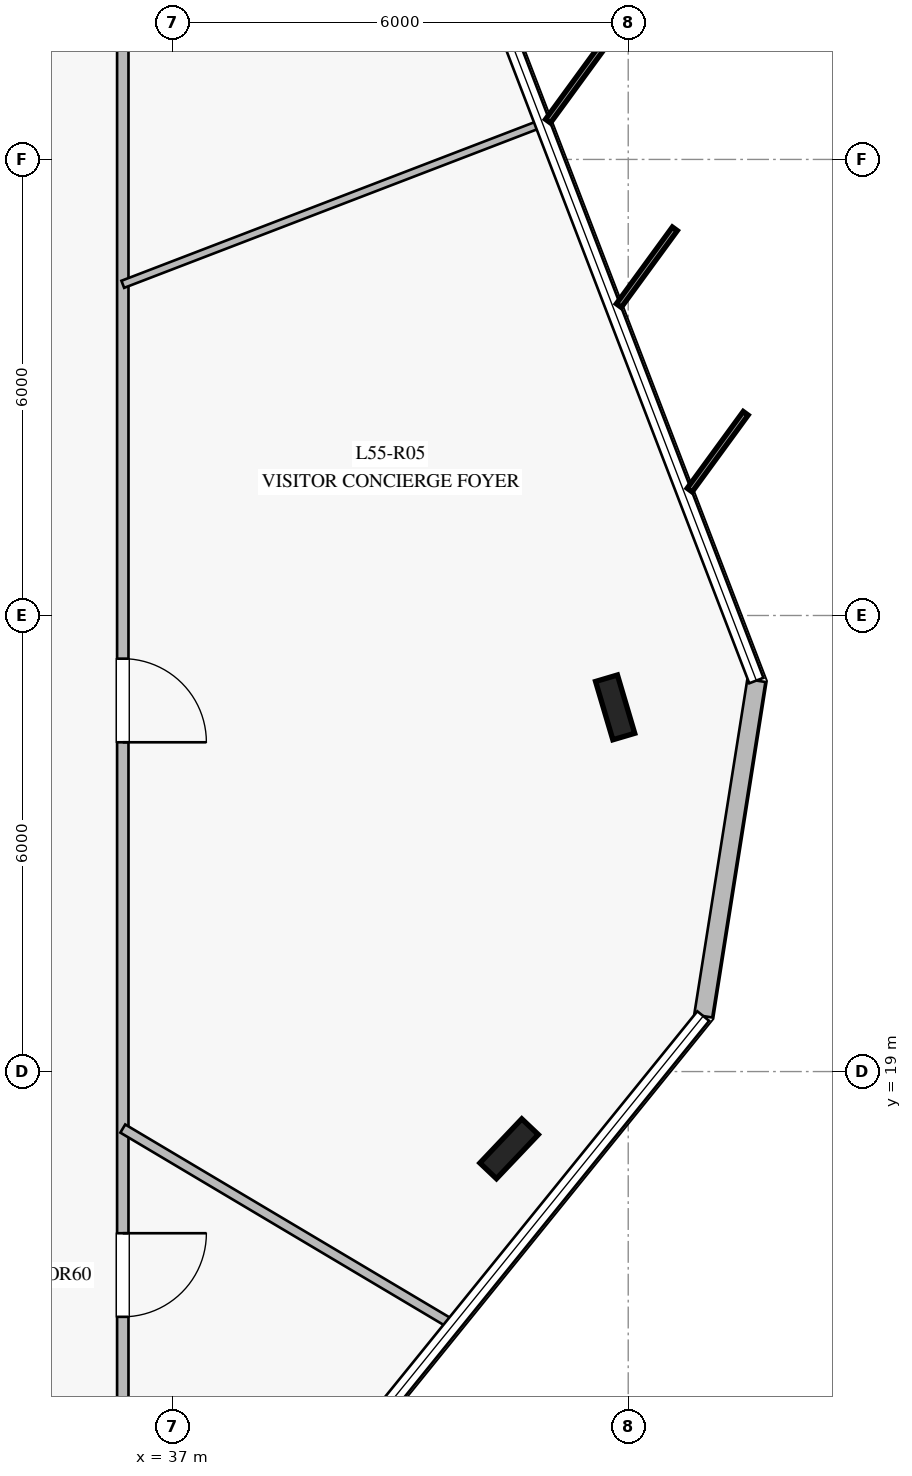
"""IFC4 building model, lengths in metres.
Left out: names, types, materials, properties, quantities, classifications, styles, units other than length and angle.
Written with IfcOpenShell. Run it as: python <this file> out.ifc"""

import sys

from ifc_helpers import new_model, si_unit, direction, frame, frame_2d, origin, origin_2d, place, context, subcontext, project, spatial, rectangle, i_section, extrude, element, fill, save


model = new_model("IFC4")
c1 = context("Model", 3, precision=1e-05, world=origin(), true_north=direction((0.0, 1.0)))
c2 = subcontext(c1, "Body", "Model", "MODEL_VIEW")
j1 = project(units=[si_unit("LENGTHUNIT", "METRE"), si_unit("PLANEANGLEUNIT", "RADIAN")], contexts=[c1])
p1 = place(None, origin())
s1 = spatial("IfcSite", under=j1, at=p1, CompositionType="ELEMENT")
p2 = place(p1, origin())
s2 = spatial("IfcBuilding", under=s1, at=p2, CompositionType="ELEMENT")
p3 = place(p2, frame((0.0, 0.0, 228.8)))
s3 = spatial("IfcBuildingStorey", under=s2, at=p3, CompositionType="ELEMENT", Elevation=228.8)
for number, where, z_axis, x_axis in (
    (1, (41.433, 17.984, 0.0), (0.0, 0.0, 1.0), (0.688, 0.725, 0.0)),
    (2, (42.828, 23.791, 0.0), (0.0, 0.0, 1.0), (-0.284, 0.959, 0.0)),
):
    element("IfcColumn", number, at=place(p3, frame(where, z_axis=z_axis, x_axis=x_axis)), inside=s3, PredefinedType="COLUMN", context=c2, shape_type="SweptSolid", body=[
        extrude(i_section(OverallWidth=0.3, OverallDepth=0.8, WebThickness=0.018, FlangeThickness=0.033, at=origin_2d()), origin(), (0.0, 0.0, 1.0), 4.0),
    ])
p4 = place(p3, frame((43.987, 19.73, 0.0), z_axis=(0.0, 0.0, 1.0), x_axis=(0.156402986275, 0.987693325828, 0.0)))
e3 = element("IfcWall", 3, at=p4, inside=s3, PredefinedType="STANDARD", context=c2, shape_type="SweptSolid", body=[
    extrude(rectangle(XDim=4.469, YDim=0.24, at=frame_2d((2.234, 0.0))), origin(), (0.0, 0.0, 1.0), 3.78),
])
p5 = place(p3, frame((36.35, 35.75, 0.0), z_axis=(0.0, 0.0, 1.0), x_axis=(0.0, -1.0, 0.0)))
e4 = element("IfcWall", 4, at=p5, inside=s3, PredefinedType="PARTITIONING", context=c2, shape_type="SweptSolid", body=[
    extrude(rectangle(XDim=21.5, YDim=0.15, at=frame_2d((10.75, 0.0))), origin(), (0.0, 0.0, 1.0), 3.28),
])
p6 = place(p5, frame((18.877, 0.0, 0.0)))
e5 = element("IfcOpeningElement", 5, at=p6, cuts=e4, PredefinedType="OPENING", context=c2, shape_type="SweptSolid", body=[
    extrude(rectangle(XDim=1.1, YDim=2.2, at=frame_2d((0.55, 1.1))), frame((0.0, 0.085, 0.0), z_axis=(0.0, -1.0, 0.0), x_axis=(1.0, 0.0, 0.0)), (0.0, 0.0, 1.0), 0.17),
])
p7 = place(p5, frame((11.318, 0.0, 0.0)))
e6 = element("IfcOpeningElement", 6, at=p7, cuts=e4, PredefinedType="OPENING", context=c2, shape_type="SweptSolid", body=[
    extrude(rectangle(XDim=1.1, YDim=2.2, at=frame_2d((0.55, 1.1))), frame((0.0, 0.085, 0.0), z_axis=(0.0, -1.0, 0.0), x_axis=(1.0, 0.0, 0.0)), (0.0, 0.0, 1.0), 0.17),
])
p8 = place(p3, frame((36.35, 18.25, 0.0), z_axis=(0.0, 0.0, 1.0), x_axis=(0.859461673758, -0.511200187148, 0.0)))
e7 = element("IfcWall", 7, at=p8, inside=s3, PredefinedType="PARTITIONING", context=c2, shape_type="SweptSolid", body=[
    extrude(rectangle(XDim=5.039, YDim=0.125, at=frame_2d((2.52, 0.0))), origin(), (0.0, 0.0, 1.0), 3.18),
])
p9 = place(p3, frame((36.35, 29.357, 0.0), z_axis=(0.0, 0.0, 1.0), x_axis=(0.933551363276, 0.358443652652, 0.0)))
e8 = element("IfcWall", 8, at=p9, inside=s3, PredefinedType="MOVABLE", context=c2, shape_type="SweptSolid", body=[
    extrude(rectangle(XDim=5.898, YDim=0.1, at=frame_2d((2.949, 0.0))), origin(), (0.0, 0.0, 1.0), 3.18),
])
p10 = place(p6, origin())
e9 = element("IfcDoor", 9, at=p10, inside=s3, OperationType="SINGLE_SWING_LEFT", PredefinedType="DOOR", context=c2, shape_type="SweptSolid", body=[
    extrude(rectangle(XDim=1.1, YDim=2.2, at=frame_2d((0.55, 1.1))), frame((0.0, 0.025, 0.0), z_axis=(0.0, -1.0, 0.0), x_axis=(1.0, 0.0, 0.0)), (0.0, 0.0, 1.0), 0.05),
])
fill(e5, e9)
p11 = place(p7, origin())
e10 = element("IfcDoor", 10, at=p11, inside=s3, OperationType="SINGLE_SWING_RIGHT", PredefinedType="DOOR", context=c2, shape_type="SweptSolid", body=[
    extrude(rectangle(XDim=1.1, YDim=2.2, at=frame_2d((0.55, 1.1))), frame((0.0, 0.025, 0.0), z_axis=(0.0, -1.0, 0.0), x_axis=(1.0, 0.0, 0.0)), (0.0, 0.0, 1.0), 0.05),
])
fill(e6, e10)
save(model, sys.argv[1])
